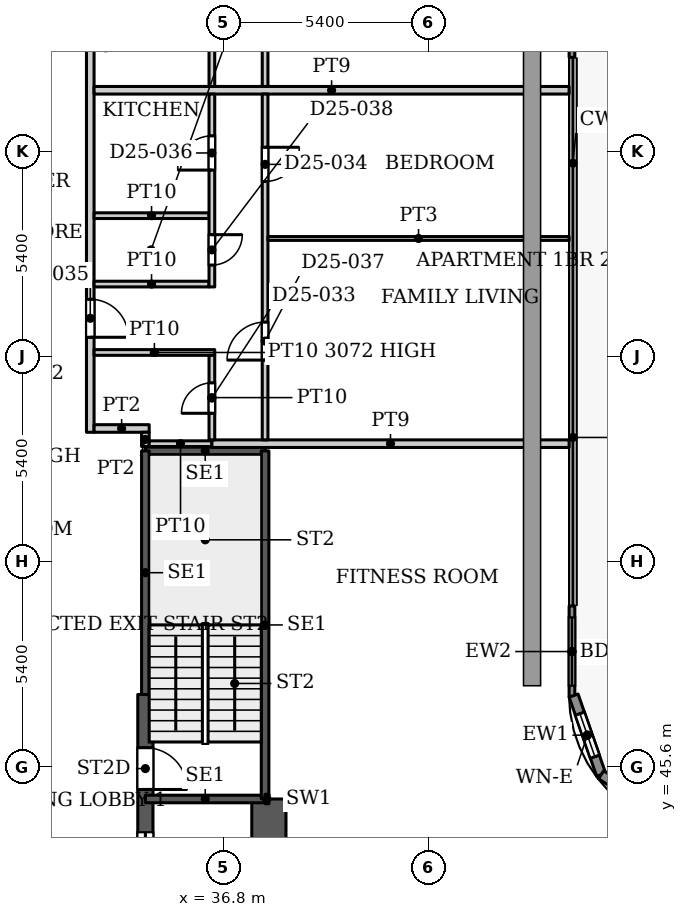
"""IFC4 building model, lengths in metres.
Left out: names, types, materials, properties, quantities, classifications, styles, units other than length and angle.
Written with IfcOpenShell. Run it as: python <this file> out.ifc"""

import sys

from ifc_helpers import new_model, si_unit, direction, frame, frame_2d, origin, place, context, subcontext, project, spatial, rectangle, extrude, source, transform, mapped, element, fill, save


model = new_model("IFC4")
c1 = context("Model", 3, precision=1e-05, world=origin(), true_north=direction((0.0, 1.0)))
c2 = subcontext(c1, "Body", "Model", "MODEL_VIEW")
j1 = project(units=[si_unit("LENGTHUNIT", "METRE"), si_unit("PLANEANGLEUNIT", "RADIAN")], contexts=[c1])
p1 = place(None, origin())
s1 = spatial("IfcSite", under=j1, at=p1, CompositionType="ELEMENT")
p2 = place(p1, origin())
s2 = spatial("IfcBuilding", under=s1, at=p2, CompositionType="ELEMENT")
p3 = place(p2, frame((0.0, 0.0, 113.6)))
s3 = spatial("IfcBuildingStorey", under=s2, at=p3, CompositionType="ELEMENT", Elevation=113.6)
p4 = place(p3, frame((34.75, 29.05, 0.0), z_axis=(0.0, 0.0, 1.0), x_axis=(0.0, 1.0, 0.0)))
e1 = element("IfcWall", 1, at=p4, inside=s3, PredefinedType="SHEAR", context=c2, shape_type="SweptSolid", body=[
    extrude(rectangle(XDim=18.45, YDim=0.4, at=frame_2d((9.225, 0.0))), origin(), (0.0, 0.0, 1.0), 3.9),
])
p5 = place(p4, frame((8.025, 0.0, 0.0)))
e2 = element("IfcOpeningElement", 2, at=p5, cuts=e1, PredefinedType="OPENING", context=c2, shape_type="SweptSolid", body=[
    extrude(rectangle(XDim=1.1, YDim=2.2, at=frame_2d((0.55, 1.1))), frame((0.0, 0.21, 0.0), z_axis=(0.0, -1.0, 0.0), x_axis=(1.0, 0.0, 0.0)), (0.0, 0.0, 1.0), 0.42),
])
p6 = place(p4, frame((10.875, 0.0, 0.0)))
e3 = element("IfcOpeningElement", 3, at=p6, cuts=e1, PredefinedType="OPENING", context=c2, shape_type="SweptSolid", body=[
    extrude(rectangle(XDim=1.1, YDim=2.2, at=frame_2d((0.55, 1.1))), frame((0.0, 0.21, 0.0), z_axis=(0.0, -1.0, 0.0), x_axis=(1.0, 0.0, 0.0)), (0.0, 0.0, 1.0), 0.42),
])
p7 = place(p4, frame((13.725, 0.0, 0.0)))
e4 = element("IfcOpeningElement", 4, at=p7, cuts=e1, PredefinedType="OPENING", context=c2, shape_type="SweptSolid", body=[
    extrude(rectangle(XDim=1.1, YDim=2.2, at=frame_2d((0.55, 1.1))), frame((0.0, 0.21, 0.0), z_axis=(0.0, -1.0, 0.0), x_axis=(1.0, 0.0, 0.0)), (0.0, 0.0, 1.0), 0.42),
])
p8 = place(p4, frame((15.95, 0.0, 0.0)))
e5 = element("IfcOpeningElement", 5, at=p8, cuts=e1, PredefinedType="OPENING", context=c2, shape_type="SweptSolid", body=[
    extrude(rectangle(XDim=1.1, YDim=2.2, at=frame_2d((0.55, 1.1))), frame((0.0, 0.21, 0.0), z_axis=(0.0, -1.0, 0.0), x_axis=(1.0, 0.0, 0.0)), (0.0, 0.0, 1.0), 0.42),
])
p9 = place(p3, frame((38.0, 36.2, 0.0), z_axis=(0.0, 0.0, 1.0), x_axis=(0.0, 1.0, 0.0)))
e6 = element("IfcWall", 6, at=p9, inside=s3, PredefinedType="SHEAR", context=c2, shape_type="SweptSolid", body=[
    extrude(rectangle(XDim=8.55, YDim=0.9, at=frame_2d((4.275, 0.0))), origin(), (0.0, 0.0, 1.0), 3.9),
])
p10 = place(p3, frame((45.975, 66.665, 0.0), z_axis=(0.0, 0.0, 1.0), x_axis=(0.0, -1.0, 0.0)))
e7 = element("IfcWall", 7, at=p10, inside=s3, PredefinedType="SOLIDWALL", context=c2, shape_type="SweptSolid", body=[
    extrude(rectangle(XDim=2.4, YDim=0.15, at=frame_2d((1.2, 0.0))), origin(), (0.0, 0.0, 1.0), 3.75),
])
p11 = place(p10, frame((0.3, 0.0, 0.0)))
e8 = element("IfcOpeningElement", 8, at=p11, cuts=e7, PredefinedType="OPENING", context=c2, shape_type="SweptSolid", body=[
    extrude(rectangle(XDim=1.8, YDim=2.4, at=frame_2d((0.9, 1.2))), frame((0.0, 0.085, 0.0), z_axis=(0.0, -1.0, 0.0), x_axis=(1.0, 0.0, 0.0)), (0.0, 0.0, 1.0), 0.17),
])
p12 = place(p3, frame((45.975, 49.83, 0.0), z_axis=(0.0, 0.0, 1.0), x_axis=(0.0, -1.0, 0.0)))
e9 = element("IfcWall", 9, at=p12, inside=s3, PredefinedType="SOLIDWALL", context=c2, shape_type="SweptSolid", body=[
    extrude(rectangle(XDim=2.4, YDim=0.15, at=frame_2d((1.2, 0.0))), origin(), (0.0, 0.0, 1.0), 3.75),
])
p13 = place(p12, frame((0.3, 0.0, 0.0)))
e10 = element("IfcOpeningElement", 10, at=p13, cuts=e9, PredefinedType="OPENING", context=c2, shape_type="SweptSolid", body=[
    extrude(rectangle(XDim=1.8, YDim=2.4, at=frame_2d((0.9, 1.2))), frame((0.0, 0.085, 0.0), z_axis=(0.0, -1.0, 0.0), x_axis=(1.0, 0.0, 0.0)), (0.0, 0.0, 1.0), 0.17),
])
p14 = place(p3, frame((46.018, 47.471, 0.0), z_axis=(0.0, 0.0, 1.0), x_axis=(0.328791208903, -0.944402637093, 0.0)))
e11 = element("IfcWall", 11, at=p14, inside=s3, PredefinedType="SOLIDWALL", context=c2, shape_type="SweptSolid", body=[
    extrude(rectangle(XDim=2.205, YDim=0.25, at=frame_2d((1.102, 0.0))), origin(), (0.0, 0.0, 1.0), 3.75),
])
p15 = place(p14, frame((0.503, 0.0, 0.6)))
e12 = element("IfcOpeningElement", 12, at=p15, cuts=e11, PredefinedType="OPENING", context=c2, shape_type="SweptSolid", body=[
    extrude(rectangle(XDim=1.2, YDim=2.1, at=frame_2d((0.6, 1.05))), frame((0.0, 0.135, 0.0), z_axis=(0.0, -1.0, 0.0), x_axis=(1.0, 0.0, 0.0)), (0.0, 0.0, 1.0), 0.27),
])
p16 = place(p3, frame((46.743, 45.389, 0.0), z_axis=(0.0, 0.0, 1.0), x_axis=(0.831449265529, -0.555600682912, 0.0)))
e13 = element("IfcWall", 13, at=p16, inside=s3, PredefinedType="SOLIDWALL", context=c2, shape_type="SweptSolid", body=[
    extrude(rectangle(XDim=2.251, YDim=0.25, at=frame_2d((1.126, 0.0))), origin(), (0.0, 0.0, 1.0), 3.75),
])
p17 = place(p16, frame((0.525, 0.0, 0.6)))
e14 = element("IfcOpeningElement", 14, at=p17, cuts=e13, PredefinedType="OPENING", context=c2, shape_type="SweptSolid", body=[
    extrude(rectangle(XDim=1.2, YDim=2.1, at=frame_2d((0.6, 1.05))), frame((0.0, 0.135, 0.0), z_axis=(0.0, -1.0, 0.0), x_axis=(1.0, 0.0, 0.0)), (0.0, 0.0, 1.0), 0.27),
])
for number, where, z_axis, x_axis in (
    (15, (34.75, 44.75, 0.0), (0.0, 0.0, 1.0), (1.0, 0.0, 0.0)),
    (16, (34.75, 53.91, 0.0), (0.0, 0.0, 1.0), (1.0, 0.0, 0.0)),
):
    element("IfcWall", number, at=place(p3, frame(where, z_axis=z_axis, x_axis=x_axis)), inside=s3, PredefinedType="SHEAR", context=c2, shape_type="SweptSolid", body=[
        extrude(rectangle(XDim=3.15, YDim=0.2, at=frame_2d((1.575, 0.0))), origin(), (0.0, 0.0, 1.0), 3.9),
    ])
p18 = place(p3, frame((34.75, 47.5, 0.0), z_axis=(0.0, 0.0, 1.0), x_axis=(0.0, 1.0, 0.0)))
e17 = element("IfcWall", 17, at=p18, inside=s3, PredefinedType="SHEAR", context=c2, shape_type="SweptSolid", body=[
    extrude(rectangle(XDim=6.41, YDim=0.2, at=frame_2d((3.205, 0.0))), origin(), (0.0, 0.0, 1.0), 3.9),
])
p19 = place(p3, frame((37.9, 44.75, 0.0), z_axis=(0.0, 0.0, 1.0), x_axis=(0.0, 1.0, 0.0)))
e18 = element("IfcWall", 18, at=p19, inside=s3, PredefinedType="SHEAR", context=c2, shape_type="SweptSolid", body=[
    extrude(rectangle(XDim=9.16, YDim=0.2, at=frame_2d((4.58, 0.0))), origin(), (0.0, 0.0, 1.0), 3.9),
])
p20 = place(p3, frame((37.9, 44.75, 0.0), z_axis=(0.0, 0.0, 1.0), x_axis=(1.0, 0.0, 0.0)))
e19 = element("IfcWall", 19, at=p20, inside=s3, PredefinedType="PARTITIONING", context=c2, shape_type="SweptSolid", body=[
    extrude(rectangle(XDim=0.1, YDim=0.25, at=frame_2d((0.05, 0.0))), origin(), (0.0, 0.0, 1.0), 3.9),
])
p21 = place(p3, frame((33.3, 54.4, 0.0), z_axis=(0.0, 0.0, 1.0), x_axis=(0.0, 1.0, 0.0)))
e20 = element("IfcWall", 20, at=p21, inside=s3, PredefinedType="PARTITIONING", context=c2, shape_type="SweptSolid", body=[
    extrude(rectangle(XDim=24.8, YDim=0.2, at=frame_2d((12.4, 0.0))), origin(), (0.0, 0.0, 1.0), 3.6),
])
p22 = place(p21, frame((2.5, 0.0, 0.0)))
e21 = element("IfcOpeningElement", 21, at=p22, cuts=e20, PredefinedType="OPENING", context=c2, shape_type="SweptSolid", body=[
    extrude(rectangle(XDim=1.0, YDim=2.1, at=frame_2d((0.5, 1.05))), frame((0.0, 0.11, 0.0), z_axis=(0.0, -1.0, 0.0), x_axis=(1.0, 0.0, 0.0)), (0.0, 0.0, 1.0), 0.22),
])
p23 = place(p21, frame((22.6, 0.0, 0.0)))
e22 = element("IfcOpeningElement", 22, at=p23, cuts=e20, PredefinedType="OPENING", context=c2, shape_type="SweptSolid", body=[
    extrude(rectangle(XDim=1.0, YDim=2.1, at=frame_2d((0.5, 1.05))), frame((0.0, 0.11, 0.0), z_axis=(0.0, -1.0, 0.0), x_axis=(1.0, 0.0, 0.0)), (0.0, 0.0, 1.0), 0.22),
])
p24 = place(p3, frame((33.4, 54.5, 0.0), z_axis=(0.0, 0.0, 1.0), x_axis=(1.0, 0.0, 0.0)))
e23 = element("IfcWall", 23, at=p24, inside=s3, PredefinedType="PARTITIONING", context=c2, shape_type="SweptSolid", body=[
    extrude(rectangle(XDim=1.45, YDim=0.2, at=frame_2d((0.725, 0.0))), origin(), (0.0, 0.0, 1.0), 3.6),
])
p25 = place(p3, frame((33.4, 56.5, 0.0), z_axis=(0.0, 0.0, 1.0), x_axis=(1.0, 0.0, 0.0)))
e24 = element("IfcWall", 24, at=p25, inside=s3, PredefinedType="PARTITIONING", context=c2, shape_type="SweptSolid", body=[
    extrude(rectangle(XDim=3.175, YDim=0.15, at=frame_2d((1.587, 0.0))), origin(), (0.0, 0.0, 1.0), 3.072),
])
for number, where, z_axis, x_axis in (
    (25, (33.4, 58.3, 0.0), (0.0, 0.0, 1.0), (1.0, 0.0, 0.0)),
    (26, (33.4, 60.1, 0.0), (0.0, 0.0, 1.0), (1.0, 0.0, 0.0)),
):
    element("IfcWall", number, at=place(p3, frame(where, z_axis=z_axis, x_axis=x_axis)), inside=s3, PredefinedType="PARTITIONING", context=c2, shape_type="SweptSolid", body=[
        extrude(rectangle(XDim=3.025, YDim=0.15, at=frame_2d((1.513, 0.0))), origin(), (0.0, 0.0, 1.0), 3.6),
    ])
p26 = place(p3, frame((33.4, 63.4, 0.0), z_axis=(0.0, 0.0, 1.0), x_axis=(1.0, 0.0, 0.0)))
e27 = element("IfcWall", 27, at=p26, inside=s3, PredefinedType="PARTITIONING", context=c2, shape_type="SweptSolid", body=[
    extrude(rectangle(XDim=12.5, YDim=0.2, at=frame_2d((6.25, 0.0))), origin(), (0.0, 0.0, 1.0), 3.6),
])
p27 = place(p3, frame((34.75, 54.025, 0.0), z_axis=(0.0, 0.0, 1.0), x_axis=(0.0, 1.0, 0.0)))
e28 = element("IfcWall", 28, at=p27, inside=s3, PredefinedType="PARTITIONING", context=c2, shape_type="SweptSolid", body=[
    extrude(rectangle(XDim=0.375, YDim=0.2, at=frame_2d((0.188, 0.0))), origin(), (0.0, 0.0, 1.0), 3.6),
])
p28 = place(p3, frame((34.85, 54.1, 0.0), z_axis=(0.0, 0.0, 1.0), x_axis=(1.0, 0.0, 0.0)))
e29 = element("IfcWall", 29, at=p28, inside=s3, PredefinedType="PARTITIONING", context=c2, shape_type="SweptSolid", body=[
    extrude(rectangle(XDim=1.65, YDim=0.15, at=frame_2d((0.825, 0.0))), origin(), (0.0, 0.0, 1.0), 3.6),
])
p29 = place(p3, frame((36.5, 54.1, 0.0), z_axis=(0.0, 0.0, 1.0), x_axis=(1.0, 0.0, 0.0)))
e30 = element("IfcWall", 30, at=p29, inside=s3, PredefinedType="PARTITIONING", context=c2, shape_type="SweptSolid", body=[
    extrude(rectangle(XDim=9.4, YDim=0.2, at=frame_2d((4.7, 0.0))), origin(), (0.0, 0.0, 1.0), 3.6),
])
p30 = place(p3, frame((36.5, 54.2, 0.0), z_axis=(0.0, 0.0, 1.0), x_axis=(0.0, 1.0, 0.0)))
e31 = element("IfcWall", 31, at=p30, inside=s3, PredefinedType="PARTITIONING", context=c2, shape_type="SweptSolid", body=[
    extrude(rectangle(XDim=2.225, YDim=0.15, at=frame_2d((1.113, 0.0))), origin(), (0.0, 0.0, 1.0), 3.6),
])
p31 = place(p30, frame((0.7, 0.0, 0.0)))
e32 = element("IfcOpeningElement", 32, at=p31, cuts=e31, PredefinedType="OPENING", context=c2, shape_type="SweptSolid", body=[
    extrude(rectangle(XDim=0.8, YDim=2.1, at=frame_2d((0.4, 1.05))), frame((0.0, 0.085, 0.0), z_axis=(0.0, -1.0, 0.0), x_axis=(1.0, 0.0, 0.0)), (0.0, 0.0, 1.0), 0.17),
])
p32 = place(p3, frame((36.5, 58.225, 0.0), z_axis=(0.0, 0.0, 1.0), x_axis=(0.0, 1.0, 0.0)))
e33 = element("IfcWall", 33, at=p32, inside=s3, PredefinedType="PARTITIONING", context=c2, shape_type="SweptSolid", body=[
    extrude(rectangle(XDim=5.075, YDim=0.15, at=frame_2d((2.538, 0.0))), origin(), (0.0, 0.0, 1.0), 3.6),
])
p33 = place(p32, frame((3.075, 0.0, 0.0)))
e34 = element("IfcOpeningElement", 34, at=p33, cuts=e33, PredefinedType="OPENING", context=c2, shape_type="SweptSolid", body=[
    extrude(rectangle(XDim=0.9, YDim=2.1, at=frame_2d((0.45, 1.05))), frame((0.0, 0.085, 0.0), z_axis=(0.0, -1.0, 0.0), x_axis=(1.0, 0.0, 0.0)), (0.0, 0.0, 1.0), 0.17),
])
p34 = place(p32, frame((0.575, 0.0, 0.0)))
e35 = element("IfcOpeningElement", 35, at=p34, cuts=e33, PredefinedType="OPENING", context=c2, shape_type="SweptSolid", body=[
    extrude(rectangle(XDim=0.8, YDim=2.1, at=frame_2d((0.4, 1.05))), frame((0.0, 0.085, 0.0), z_axis=(0.0, -1.0, 0.0), x_axis=(1.0, 0.0, 0.0)), (0.0, 0.0, 1.0), 0.17),
])
p35 = place(p3, frame((36.5, 63.5, 0.0), z_axis=(0.0, 0.0, 1.0), x_axis=(0.0, 1.0, 0.0)))
e36 = element("IfcWall", 36, at=p35, inside=s3, PredefinedType="PARTITIONING", context=c2, shape_type="SweptSolid", body=[
    extrude(rectangle(XDim=12.875, YDim=0.15, at=frame_2d((6.438, 0.0))), origin(), (0.0, 0.0, 1.0), 3.6),
])
p36 = place(p35, frame((7.9, 0.0, 0.0)))
e37 = element("IfcOpeningElement", 37, at=p36, cuts=e36, PredefinedType="OPENING", context=c2, shape_type="SweptSolid", body=[
    extrude(rectangle(XDim=0.8, YDim=2.1, at=frame_2d((0.4, 1.05))), frame((0.0, 0.085, 0.0), z_axis=(0.0, -1.0, 0.0), x_axis=(1.0, 0.0, 0.0)), (0.0, 0.0, 1.0), 0.17),
])
p37 = place(p35, frame((10.9, 0.0, 0.0)))
e38 = element("IfcOpeningElement", 38, at=p37, cuts=e36, PredefinedType="OPENING", context=c2, shape_type="SweptSolid", body=[
    extrude(rectangle(XDim=0.8, YDim=2.1, at=frame_2d((0.4, 1.05))), frame((0.0, 0.085, 0.0), z_axis=(0.0, -1.0, 0.0), x_axis=(1.0, 0.0, 0.0)), (0.0, 0.0, 1.0), 0.17),
])
p38 = place(p35, frame((1.45, 0.0, 0.0)))
e39 = element("IfcOpeningElement", 39, at=p38, cuts=e36, PredefinedType="OPENING", context=c2, shape_type="SweptSolid", body=[
    extrude(rectangle(XDim=0.9, YDim=2.1, at=frame_2d((0.45, 1.05))), frame((0.0, 0.085, 0.0), z_axis=(0.0, -1.0, 0.0), x_axis=(1.0, 0.0, 0.0)), (0.0, 0.0, 1.0), 0.17),
])
p39 = place(p35, frame((5.2, 0.0, 0.0)))
e40 = element("IfcOpeningElement", 40, at=p39, cuts=e36, PredefinedType="OPENING", context=c2, shape_type="SweptSolid", body=[
    extrude(rectangle(XDim=0.8, YDim=2.1, at=frame_2d((0.4, 1.05))), frame((0.0, 0.085, 0.0), z_axis=(0.0, -1.0, 0.0), x_axis=(1.0, 0.0, 0.0)), (0.0, 0.0, 1.0), 0.17),
])
p40 = place(p3, frame((37.9, 54.2, 0.0), z_axis=(0.0, 0.0, 1.0), x_axis=(0.0, 1.0, 0.0)))
e41 = element("IfcWall", 41, at=p40, inside=s3, PredefinedType="PARTITIONING", context=c2, shape_type="SweptSolid", body=[
    extrude(rectangle(XDim=9.1, YDim=0.15, at=frame_2d((4.55, 0.0))), origin(), (0.0, 0.0, 1.0), 3.6),
])
p41 = place(p40, frame((6.8, 0.0, 0.0)))
e42 = element("IfcOpeningElement", 42, at=p41, cuts=e41, PredefinedType="OPENING", context=c2, shape_type="SweptSolid", body=[
    extrude(rectangle(XDim=0.9, YDim=2.1, at=frame_2d((0.45, 1.05))), frame((0.0, 0.085, 0.0), z_axis=(0.0, -1.0, 0.0), x_axis=(1.0, 0.0, 0.0)), (0.0, 0.0, 1.0), 0.17),
])
p42 = place(p40, frame((2.1, 0.0, 0.0)))
e43 = element("IfcOpeningElement", 43, at=p42, cuts=e41, PredefinedType="OPENING", context=c2, shape_type="SweptSolid", body=[
    extrude(rectangle(XDim=1.0, YDim=2.1, at=frame_2d((0.5, 1.05))), frame((0.0, 0.085, 0.0), z_axis=(0.0, -1.0, 0.0), x_axis=(1.0, 0.0, 0.0)), (0.0, 0.0, 1.0), 0.17),
])
p43 = place(p3, frame((37.9, 63.5, 0.0), z_axis=(0.0, 0.0, 1.0), x_axis=(0.0, 1.0, 0.0)))
e44 = element("IfcWall", 44, at=p43, inside=s3, PredefinedType="PARTITIONING", context=c2, shape_type="SweptSolid", body=[
    extrude(rectangle(XDim=15.7, YDim=0.15, at=frame_2d((7.85, 0.0))), origin(), (0.0, 0.0, 1.0), 3.6),
])
p44 = place(p43, frame((1.1, 0.0, 0.0)))
e45 = element("IfcOpeningElement", 45, at=p44, cuts=e44, PredefinedType="OPENING", context=c2, shape_type="SweptSolid", body=[
    extrude(rectangle(XDim=0.9, YDim=2.1, at=frame_2d((0.45, 1.05))), frame((0.0, 0.085, 0.0), z_axis=(0.0, -1.0, 0.0), x_axis=(1.0, 0.0, 0.0)), (0.0, 0.0, 1.0), 0.17),
])
p45 = place(p43, frame((10.85, 0.0, 0.0)))
e46 = element("IfcOpeningElement", 46, at=p45, cuts=e44, PredefinedType="OPENING", context=c2, shape_type="SweptSolid", body=[
    extrude(rectangle(XDim=0.9, YDim=2.1, at=frame_2d((0.45, 1.05))), frame((0.0, 0.085, 0.0), z_axis=(0.0, -1.0, 0.0), x_axis=(1.0, 0.0, 0.0)), (0.0, 0.0, 1.0), 0.17),
])
p46 = place(p43, frame((13.8, 0.0, 0.0)))
e47 = element("IfcOpeningElement", 47, at=p46, cuts=e44, PredefinedType="OPENING", context=c2, shape_type="SweptSolid", body=[
    extrude(rectangle(XDim=1.0, YDim=2.1, at=frame_2d((0.5, 1.05))), frame((0.0, 0.085, 0.0), z_axis=(0.0, -1.0, 0.0), x_axis=(1.0, 0.0, 0.0)), (0.0, 0.0, 1.0), 0.17),
])
p47 = place(p43, frame((4.1, 0.0, 0.0)))
e48 = element("IfcOpeningElement", 48, at=p47, cuts=e44, PredefinedType="OPENING", context=c2, shape_type="SweptSolid", body=[
    extrude(rectangle(XDim=0.9, YDim=2.1, at=frame_2d((0.45, 1.05))), frame((0.0, 0.085, 0.0), z_axis=(0.0, -1.0, 0.0), x_axis=(1.0, 0.0, 0.0)), (0.0, 0.0, 1.0), 0.17),
])
p48 = place(p43, frame((8.45, 0.0, 0.0)))
e49 = element("IfcOpeningElement", 49, at=p48, cuts=e44, PredefinedType="OPENING", context=c2, shape_type="SweptSolid", body=[
    extrude(rectangle(XDim=0.9, YDim=2.1, at=frame_2d((0.45, 1.05))), frame((0.0, 0.085, 0.0), z_axis=(0.0, -1.0, 0.0), x_axis=(1.0, 0.0, 0.0)), (0.0, 0.0, 1.0), 0.17),
])
p49 = place(p3, frame((37.975, 59.5, 0.0), z_axis=(0.0, 0.0, 1.0), x_axis=(1.0, 0.0, 0.0)))
e50 = element("IfcWall", 50, at=p49, inside=s3, PredefinedType="PARTITIONING", context=c2, shape_type="SweptSolid", body=[
    extrude(rectangle(XDim=7.925, YDim=0.1, at=frame_2d((3.962, 0.0))), origin(), (0.0, 0.0, 1.0), 3.6),
])
m1 = source(origin(), c2, "Body", "SweptSolid", [
    extrude(rectangle(XDim=1.8, YDim=2.4, at=frame_2d((0.9, 1.2))), frame((0.0, 0.025, 0.0), z_axis=(0.0, -1.0, 0.0), x_axis=(1.0, 0.0, 0.0)), (0.0, 0.0, 1.0), 0.05),
])
p50 = place(p13, origin())
e51 = element("IfcDoor", 51, at=p50, inside=s3, OperationType="SLIDING_TO_LEFT", PredefinedType="DOOR", context=c2, shape_type="MappedRepresentation", body=[
    mapped(m1, transform((0.0, 0.0, 0.0), x_axis=(1.0, 0.0, 0.0), y_axis=(0.0, 1.0, 0.0), z_axis=(0.0, 0.0, 1.0), scale=1.0)),
])
fill(e10, e51)
m2 = source(origin(), c2, "Body", "SweptSolid", [
    extrude(rectangle(XDim=1.2, YDim=2.1, at=frame_2d((0.6, 1.05))), frame((0.0, 0.03, 0.0), z_axis=(0.0, -1.0, 0.0), x_axis=(1.0, 0.0, 0.0)), (0.0, 0.0, 1.0), 0.06),
])
p51 = place(p15, origin())
e52 = element("IfcWindow", 52, at=p51, inside=s3, PartitioningType="SINGLE_PANEL", PredefinedType="WINDOW", context=c2, shape_type="MappedRepresentation", body=[
    mapped(m2, transform((0.0, 0.0, 0.0), x_axis=(1.0, 0.0, 0.0), y_axis=(0.0, 1.0, 0.0), z_axis=(0.0, 0.0, 1.0), scale=1.0)),
])
fill(e12, e52)
m3 = source(origin(), c2, "Body", "SweptSolid", [
    extrude(rectangle(XDim=1.1, YDim=2.2, at=frame_2d((0.55, 1.1))), frame((0.0, 0.025, 0.0), z_axis=(0.0, -1.0, 0.0), x_axis=(1.0, 0.0, 0.0)), (0.0, 0.0, 1.0), 0.05),
])
p52 = place(p7, origin())
e53 = element("IfcDoor", 53, at=p52, inside=s3, OperationType="SLIDING_TO_LEFT", PredefinedType="DOOR", context=c2, shape_type="MappedRepresentation", body=[
    mapped(m3, transform((0.0, 0.0, 0.0), x_axis=(1.0, 0.0, 0.0), y_axis=(0.0, 1.0, 0.0), z_axis=(0.0, 0.0, 1.0), scale=1.0)),
])
fill(e4, e53)
m4 = source(origin(), c2, "Body", "SweptSolid", [
    extrude(rectangle(XDim=1.1, YDim=2.2, at=frame_2d((0.55, 1.1))), frame((0.0, 0.025, 0.0), z_axis=(0.0, -1.0, 0.0), x_axis=(1.0, 0.0, 0.0)), (0.0, 0.0, 1.0), 0.05),
])
p53 = place(p8, origin())
e54 = element("IfcDoor", 54, at=p53, inside=s3, OperationType="SINGLE_SWING_RIGHT", PredefinedType="DOOR", context=c2, shape_type="MappedRepresentation", body=[
    mapped(m4, transform((0.0, 0.0, 0.0), x_axis=(1.0, 0.0, 0.0), y_axis=(0.0, 1.0, 0.0), z_axis=(0.0, 0.0, 1.0), scale=1.0)),
])
fill(e5, e54)
m5 = source(origin(), c2, "Body", "SweptSolid", [
    extrude(rectangle(XDim=0.8, YDim=2.1, at=frame_2d((0.4, 1.05))), frame((0.0, 0.025, 0.0), z_axis=(0.0, -1.0, 0.0), x_axis=(1.0, 0.0, 0.0)), (0.0, 0.0, 1.0), 0.05),
])
p54 = place(p31, origin())
e55 = element("IfcDoor", 55, at=p54, inside=s3, OperationType="SINGLE_SWING_LEFT", PredefinedType="DOOR", context=c2, shape_type="MappedRepresentation", body=[
    mapped(m5, transform((0.0, 0.0, 0.0), x_axis=(1.0, 0.0, 0.0), y_axis=(0.0, 1.0, 0.0), z_axis=(0.0, 0.0, 1.0), scale=1.0)),
])
fill(e32, e55)
m6 = source(origin(), c2, "Body", "SweptSolid", [
    extrude(rectangle(XDim=0.9, YDim=2.1, at=frame_2d((0.45, 1.05))), frame((0.0, 0.025, 0.0), z_axis=(0.0, -1.0, 0.0), x_axis=(1.0, 0.0, 0.0)), (0.0, 0.0, 1.0), 0.05),
])
p55 = place(p41, origin())
e56 = element("IfcDoor", 56, at=p55, inside=s3, OperationType="SINGLE_SWING_RIGHT", PredefinedType="DOOR", context=c2, shape_type="MappedRepresentation", body=[
    mapped(m6, transform((0.0, 0.0, 0.0), x_axis=(1.0, 0.0, 0.0), y_axis=(0.0, 1.0, 0.0), z_axis=(0.0, 0.0, 1.0), scale=1.0)),
])
fill(e42, e56)
m7 = source(origin(), c2, "Body", "SweptSolid", [
    extrude(rectangle(XDim=1.0, YDim=2.1, at=frame_2d((0.5, 1.05))), frame((0.0, 0.025, 0.0), z_axis=(0.0, -1.0, 0.0), x_axis=(1.0, 0.0, 0.0)), (0.0, 0.0, 1.0), 0.05),
])
p56 = place(p22, origin())
e57 = element("IfcDoor", 57, at=p56, inside=s3, OperationType="SINGLE_SWING_RIGHT", PredefinedType="DOOR", context=c2, shape_type="MappedRepresentation", body=[
    mapped(m7, transform((0.0, 0.0, 0.0), x_axis=(1.0, 0.0, 0.0), y_axis=(0.0, 1.0, 0.0), z_axis=(0.0, 0.0, 1.0), scale=1.0)),
])
fill(e21, e57)
p57 = place(p33, origin())
e58 = element("IfcDoor", 58, at=p57, inside=s3, OperationType="SINGLE_SWING_LEFT", PredefinedType="DOOR", context=c2, shape_type="MappedRepresentation", body=[
    mapped(m6, transform((0.0, 0.0, 0.0), x_axis=(1.0, 0.0, 0.0), y_axis=(0.0, 1.0, 0.0), z_axis=(0.0, 0.0, 1.0), scale=1.0)),
])
fill(e34, e58)
m8 = source(origin(), c2, "Body", "SweptSolid", [
    extrude(rectangle(XDim=1.0, YDim=2.1, at=frame_2d((0.5, 1.05))), frame((0.0, 0.025, 0.0), z_axis=(0.0, -1.0, 0.0), x_axis=(1.0, 0.0, 0.0)), (0.0, 0.0, 1.0), 0.05),
])
p58 = place(p42, origin())
e59 = element("IfcDoor", 59, at=p58, inside=s3, OperationType="SINGLE_SWING_LEFT", PredefinedType="DOOR", context=c2, shape_type="MappedRepresentation", body=[
    mapped(m8, transform((0.0, 0.0, 0.0), x_axis=(1.0, 0.0, 0.0), y_axis=(0.0, 1.0, 0.0), z_axis=(0.0, 0.0, 1.0), scale=1.0)),
])
fill(e43, e59)
p59 = place(p34, origin())
e60 = element("IfcDoor", 60, at=p59, inside=s3, OperationType="SINGLE_SWING_RIGHT", PredefinedType="DOOR", context=c2, shape_type="MappedRepresentation", body=[
    mapped(m5, transform((0.0, 0.0, 0.0), x_axis=(1.0, 0.0, 0.0), y_axis=(0.0, 1.0, 0.0), z_axis=(0.0, 0.0, 1.0), scale=1.0)),
])
fill(e35, e60)
save(model, sys.argv[1])
